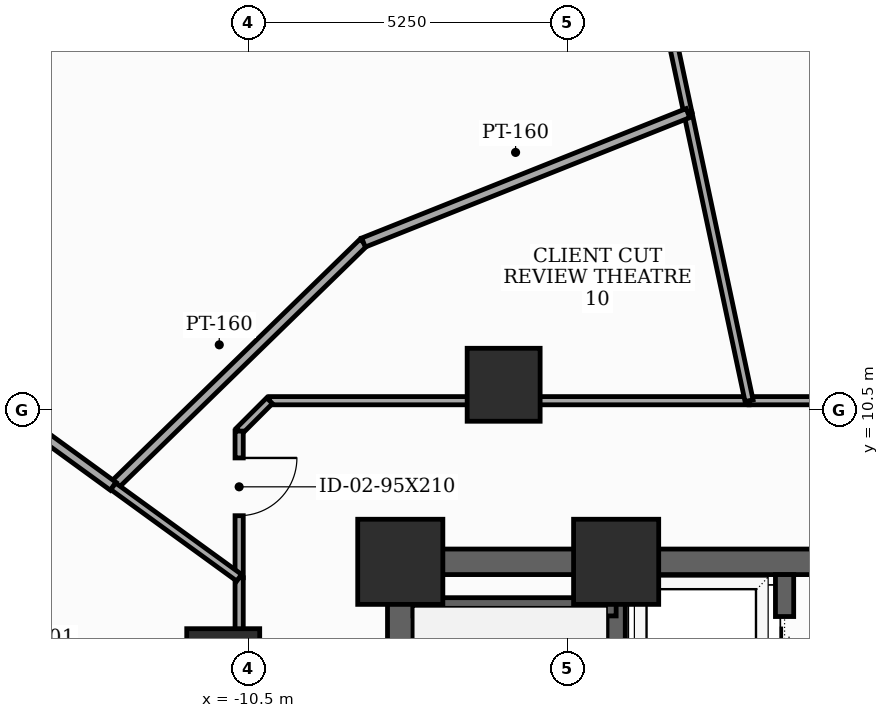
"""IFC4 building model, lengths in metres.
Left out: names, types, materials, properties, quantities, classifications, styles, units other than length and angle.
Written with IfcOpenShell. Run it as: python <this file> out.ifc"""

import sys

from ifc_helpers import new_model, si_unit, direction, frame, frame_2d, origin, origin_2d, place, context, subcontext, project, spatial, rectangle, extrude, element, fill, save


model = new_model("IFC4")
c1 = context("Model", 3, precision=1e-05, world=origin(), true_north=direction((0.0, 1.0)))
c2 = subcontext(c1, "Body", "Model", "MODEL_VIEW")
j1 = project(units=[si_unit("LENGTHUNIT", "METRE"), si_unit("PLANEANGLEUNIT", "RADIAN")], contexts=[c1])
p1 = place(None, origin())
s1 = spatial("IfcSite", under=j1, at=p1, CompositionType="ELEMENT")
p2 = place(p1, origin())
s2 = spatial("IfcBuilding", under=s1, at=p2, CompositionType="ELEMENT")
p3 = place(p2, frame((0.0, 0.0, 97.7)))
s3 = spatial("IfcBuildingStorey", under=s2, at=p3, CompositionType="ELEMENT", Elevation=97.7)
for number, where, z_axis, x_axis in (
    (1, (-4.45, 8.0, 0.0), (0.0, 0.0, 1.0), (1.0, 0.0, 0.0)),
    (2, (-8.0, 8.0, 0.0), (0.0, 0.0, 1.0), (1.0, 0.0, 0.0)),
):
    element("IfcColumn", number, at=place(p3, frame(where, z_axis=z_axis, x_axis=x_axis)), inside=s3, PredefinedType="COLUMN", context=c2, shape_type="SweptSolid", body=[
        extrude(rectangle(XDim=1.4, YDim=1.4, at=origin_2d()), origin(), (0.0, 0.0, 1.0), 3.7),
    ])
for number, where, z_axis, x_axis in (
    (3, (-6.3, 10.912, 0.0), (0.0, 0.0, 1.0), (1.0, 0.0, 0.0)),
    (4, (-10.912, 6.3, 0.0), (0.0, 0.0, 1.0), (1.0, 0.0, 0.0)),
):
    element("IfcColumn", number, at=place(p3, frame(where, z_axis=z_axis, x_axis=x_axis)), inside=s3, PredefinedType="COLUMN", context=c2, shape_type="SweptSolid", body=[
        extrude(rectangle(XDim=1.2, YDim=1.2, at=origin_2d()), origin(), (0.0, 0.0, 1.0), 3.7),
    ])
p4 = place(p3, frame((-8.0, -8.0, 0.0), z_axis=(0.0, 0.0, 1.0), x_axis=(0.0, 1.0, 0.0)))
e5 = element("IfcWall", 5, at=p4, inside=s3, PredefinedType="SHEAR", context=c2, shape_type="SweptSolid", body=[
    extrude(rectangle(XDim=16.0, YDim=0.42, at=frame_2d((8.0, 0.0))), origin(), (0.0, 0.0, 1.0), 3.5),
])
p5 = place(p4, frame((0.922, 0.0, 0.0)))
e6 = element("IfcOpeningElement", 6, at=p5, cuts=e5, PredefinedType="OPENING", context=c2, shape_type="SweptSolid", body=[
    extrude(rectangle(XDim=0.85, YDim=2.02, at=frame_2d((0.425, 1.01))), frame((0.0, 0.22, 0.0), z_axis=(0.0, -1.0, 0.0), x_axis=(1.0, 0.0, 0.0)), (0.0, 0.0, 1.0), 0.44),
])
p6 = place(p4, frame((5.35, 0.0, 0.0)))
e7 = element("IfcOpeningElement", 7, at=p6, cuts=e5, PredefinedType="OPENING", context=c2, shape_type="SweptSolid", body=[
    extrude(rectangle(XDim=1.05, YDim=2.15, at=frame_2d((0.525, 1.075))), frame((0.0, 0.22, 0.0), z_axis=(0.0, -1.0, 0.0), x_axis=(1.0, 0.0, 0.0)), (0.0, 0.0, 1.0), 0.44),
])
p7 = place(p3, frame((-8.0, 8.0, 0.0), z_axis=(0.0, 0.0, 1.0), x_axis=(1.0, 0.0, 0.0)))
e8 = element("IfcWall", 8, at=p7, inside=s3, PredefinedType="SHEAR", context=c2, shape_type="SweptSolid", body=[
    extrude(rectangle(XDim=16.0, YDim=0.42, at=frame_2d((8.0, 0.0))), origin(), (0.0, 0.0, 1.0), 3.5),
])
p8 = place(p7, frame((7.1, 0.0, 0.0)))
e9 = element("IfcOpeningElement", 9, at=p8, cuts=e8, PredefinedType="OPENING", context=c2, shape_type="SweptSolid", body=[
    extrude(rectangle(XDim=1.8, YDim=2.15, at=frame_2d((0.9, 1.075))), frame((0.0, 0.22, 0.0), z_axis=(0.0, -1.0, 0.0), x_axis=(1.0, 0.0, 0.0)), (0.0, 0.0, 1.0), 0.44),
])
p9 = place(p3, frame((-4.45, -7.79, 0.0), z_axis=(0.0, 0.0, 1.0), x_axis=(0.0, 1.0, 0.0)))
e10 = element("IfcWall", 10, at=p9, inside=s3, PredefinedType="SHEAR", context=c2, shape_type="SweptSolid", body=[
    extrude(rectangle(XDim=15.58, YDim=0.3, at=frame_2d((7.79, 0.0))), origin(), (0.0, 0.0, 1.0), 3.5),
])
p10 = place(p3, frame((-7.79, 7.26, 0.0), z_axis=(0.0, 0.0, 1.0), x_axis=(1.0, 0.0, 0.0)))
e11 = element("IfcWall", 11, at=p10, inside=s3, PredefinedType="SHEAR", context=c2, shape_type="SweptSolid", body=[
    extrude(rectangle(XDim=3.34, YDim=0.3, at=frame_2d((1.67, 0.0))), origin(), (0.0, 0.0, 1.0), 3.5),
])
p11 = place(p3, frame((-1.68, -4.85, 0.0), z_axis=(0.0, 0.0, 1.0), x_axis=(0.0, 1.0, 0.0)))
e12 = element("IfcWall", 12, at=p11, inside=s3, PredefinedType="SHEAR", context=c2, shape_type="SweptSolid", body=[
    extrude(rectangle(XDim=12.64, YDim=0.3, at=frame_2d((6.32, 0.0))), origin(), (0.0, 0.0, 1.0), 3.5),
])
p12 = place(p11, frame((3.95, 0.0, 0.0)))
e13 = element("IfcOpeningElement", 13, at=p12, cuts=e12, PredefinedType="OPENING", context=c2, shape_type="SweptSolid", body=[
    extrude(rectangle(XDim=1.1, YDim=2.1, at=frame_2d((0.55, 1.05))), frame((0.0, 0.16, 0.0), z_axis=(0.0, -1.0, 0.0), x_axis=(1.0, 0.0, 0.0)), (0.0, 0.0, 1.0), 0.32),
])
p13 = place(p11, frame((6.25, 0.0, 0.0)))
e14 = element("IfcOpeningElement", 14, at=p13, cuts=e12, PredefinedType="OPENING", context=c2, shape_type="SweptSolid", body=[
    extrude(rectangle(XDim=1.1, YDim=2.1, at=frame_2d((0.55, 1.05))), frame((0.0, 0.16, 0.0), z_axis=(0.0, -1.0, 0.0), x_axis=(1.0, 0.0, 0.0)), (0.0, 0.0, 1.0), 0.32),
])
p14 = place(p11, frame((8.55, 0.0, 0.0)))
e15 = element("IfcOpeningElement", 15, at=p14, cuts=e12, PredefinedType="OPENING", context=c2, shape_type="SweptSolid", body=[
    extrude(rectangle(XDim=1.1, YDim=2.1, at=frame_2d((0.55, 1.05))), frame((0.0, 0.16, 0.0), z_axis=(0.0, -1.0, 0.0), x_axis=(1.0, 0.0, 0.0)), (0.0, 0.0, 1.0), 0.32),
])
p15 = place(p11, frame((10.85, 0.0, 0.0)))
e16 = element("IfcOpeningElement", 16, at=p15, cuts=e12, PredefinedType="OPENING", context=c2, shape_type="SweptSolid", body=[
    extrude(rectangle(XDim=1.1, YDim=2.1, at=frame_2d((0.55, 1.05))), frame((0.0, 0.16, 0.0), z_axis=(0.0, -1.0, 0.0), x_axis=(1.0, 0.0, 0.0)), (0.0, 0.0, 1.0), 0.32),
])
p16 = place(p11, frame((0.45, 0.0, 0.0)))
e17 = element("IfcOpeningElement", 17, at=p16, cuts=e12, PredefinedType="OPENING", context=c2, shape_type="SweptSolid", body=[
    extrude(rectangle(XDim=0.85, YDim=2.02, at=frame_2d((0.425, 1.01))), frame((0.0, 0.16, 0.0), z_axis=(0.0, -1.0, 0.0), x_axis=(1.0, 0.0, 0.0)), (0.0, 0.0, 1.0), 0.32),
])
p17 = place(p11, frame((2.05, 0.0, 0.0)))
e18 = element("IfcOpeningElement", 18, at=p17, cuts=e12, PredefinedType="OPENING", context=c2, shape_type="SweptSolid", body=[
    extrude(rectangle(XDim=0.85, YDim=2.02, at=frame_2d((0.425, 1.01))), frame((0.0, 0.16, 0.0), z_axis=(0.0, -1.0, 0.0), x_axis=(1.0, 0.0, 0.0)), (0.0, 0.0, 1.0), 0.32),
])
p18 = place(p3, frame((10.15, 10.65, 0.0), z_axis=(0.0, 0.0, 1.0), x_axis=(-1.0, 0.0, 0.0)))
e19 = element("IfcWall", 19, at=p18, inside=s3, PredefinedType="PARTITIONING", context=c2, shape_type="SweptSolid", body=[
    extrude(rectangle(XDim=12.414, YDim=0.135, at=frame_2d((6.207, 0.0))), origin(), (0.0, 0.0, 1.0), 2.785),
])
p19 = place(p18, frame((7.222, 0.0, 0.0)))
e20 = element("IfcOpeningElement", 20, at=p19, cuts=e19, PredefinedType="OPENING", context=c2, shape_type="SweptSolid", body=[
    extrude(rectangle(XDim=0.95, YDim=2.1, at=frame_2d((0.475, 1.05))), frame((0.0, 0.077, 0.0), z_axis=(0.0, -1.0, 0.0), x_axis=(1.0, 0.0, 0.0)), (0.0, 0.0, 1.0), 0.155),
])
p20 = place(p3, frame((-2.264, 10.65, 0.0), z_axis=(0.0, 0.0, 1.0), x_axis=(-1.0, 0.0, 0.0)))
e21 = element("IfcWall", 21, at=p20, inside=s3, PredefinedType="PARTITIONING", context=c2, shape_type="SweptSolid", body=[
    extrude(rectangle(XDim=7.886, YDim=0.135, at=frame_2d((3.943, 0.0))), origin(), (0.0, 0.0, 1.0), 2.785),
])
p21 = place(p3, frame((-10.15, 10.65, 0.0), z_axis=(0.0, 0.0, 1.0), x_axis=(-0.707106781187, -0.707106781187, 0.0)))
e22 = element("IfcWall", 22, at=p21, inside=s3, PredefinedType="PARTITIONING", context=c2, shape_type="SweptSolid", body=[
    extrude(rectangle(XDim=0.707, YDim=0.135, at=frame_2d((0.354, 0.0))), origin(), (0.0, 0.0, 1.0), 3.5),
])
p22 = place(p3, frame((-10.65, 10.15, 0.0), z_axis=(0.0, 0.0, 1.0), x_axis=(0.0, -1.0, 0.0)))
e23 = element("IfcWall", 23, at=p22, inside=s3, PredefinedType="PARTITIONING", context=c2, shape_type="SweptSolid", body=[
    extrude(rectangle(XDim=2.412, YDim=0.135, at=frame_2d((1.206, 0.0))), origin(), (0.0, 0.0, 1.0), 3.5),
])
p23 = place(p22, frame((0.442, 0.0, 0.0)))
e24 = element("IfcOpeningElement", 24, at=p23, cuts=e23, PredefinedType="OPENING", context=c2, shape_type="SweptSolid", body=[
    extrude(rectangle(XDim=0.95, YDim=2.1, at=frame_2d((0.475, 1.05))), frame((0.0, 0.077, 0.0), z_axis=(0.0, -1.0, 0.0), x_axis=(1.0, 0.0, 0.0)), (0.0, 0.0, 1.0), 0.155),
])
p24 = place(p3, frame((-10.65, 7.738, 0.0), z_axis=(0.0, 0.0, 1.0), x_axis=(0.0, -1.0, 0.0)))
e25 = element("IfcWall", 25, at=p24, inside=s3, PredefinedType="PARTITIONING", context=c2, shape_type="SweptSolid", body=[
    extrude(rectangle(XDim=5.288, YDim=0.135, at=frame_2d((2.644, 0.0))), origin(), (0.0, 0.0, 1.0), 2.785),
])
p25 = place(p24, frame((3.755, 0.0, 0.0)))
e26 = element("IfcOpeningElement", 26, at=p25, cuts=e25, PredefinedType="OPENING", context=c2, shape_type="SweptSolid", body=[
    extrude(rectangle(XDim=0.95, YDim=2.1, at=frame_2d((0.475, 1.05))), frame((0.0, 0.077, 0.0), z_axis=(0.0, -1.0, 0.0), x_axis=(1.0, 0.0, 0.0)), (0.0, 0.0, 1.0), 0.155),
])
p26 = place(p3, frame((-6.381, 30.021, 0.0), z_axis=(0.0, 0.0, 1.0), x_axis=(0.207886847462, -0.978152881022, 0.0)))
e27 = element("IfcWall", 27, at=p26, inside=s3, PredefinedType="PARTITIONING", context=c2, shape_type="SweptSolid", body=[
    extrude(rectangle(XDim=14.968, YDim=0.135, at=frame_2d((7.484, 0.0))), origin(), (0.0, 0.0, 1.0), 2.935),
])
p27 = place(p26, frame((7.024, 0.0, 0.0)))
e28 = element("IfcOpeningElement", 28, at=p27, cuts=e27, PredefinedType="OPENING", context=c2, shape_type="SweptSolid", body=[
    extrude(rectangle(XDim=0.92, YDim=2.1, at=frame_2d((0.46, 1.05))), frame((0.0, 0.077, 0.0), z_axis=(0.0, -1.0, 0.0), x_axis=(1.0, 0.0, 0.0)), (0.0, 0.0, 1.0), 0.155),
])
p28 = place(p3, frame((-3.269, 15.38, 0.0), z_axis=(0.0, 0.0, 1.0), x_axis=(0.207859963491, -0.978158594287, 0.0)))
e29 = element("IfcWall", 29, at=p28, inside=s3, PredefinedType="PARTITIONING", context=c2, shape_type="SweptSolid", body=[
    extrude(rectangle(XDim=4.836, YDim=0.135, at=frame_2d((2.418, 0.0))), origin(), (0.0, 0.0, 1.0), 2.785),
])
p29 = place(p3, frame((-12.721, 9.242, 0.0), z_axis=(0.0, 0.0, 1.0), x_axis=(0.716351016203, 0.697740081682, 0.0)))
e30 = element("IfcWall", 30, at=p29, inside=s3, PredefinedType="PARTITIONING", context=c2, shape_type="SweptSolid", body=[
    extrude(rectangle(XDim=5.746, YDim=0.16, at=frame_2d((2.873, 0.0))), origin(), (0.0, 0.0, 1.0), 2.785),
])
p30 = place(p3, frame((-8.605, 13.251, 0.0), z_axis=(0.0, 0.0, 1.0), x_axis=(0.928804577443, 0.370569908277, 0.0)))
e31 = element("IfcWall", 31, at=p30, inside=s3, PredefinedType="PARTITIONING", context=c2, shape_type="SweptSolid", body=[
    extrude(rectangle(XDim=5.745, YDim=0.16, at=frame_2d((2.873, 0.0))), origin(), (0.0, 0.0, 1.0), 2.785),
])
p31 = place(p3, frame((-14.1, 10.245, 0.0), z_axis=(0.0, 0.0, 1.0), x_axis=(0.808828948323, -0.588043988452, 0.0)))
e32 = element("IfcWall", 32, at=p31, inside=s3, PredefinedType="PARTITIONING", context=c2, shape_type="SweptSolid", body=[
    extrude(rectangle(XDim=1.705, YDim=0.16, at=frame_2d((0.853, 0.0))), origin(), (0.0, 0.0, 1.0), 3.125),
])
p32 = place(p3, frame((-12.721, 9.242, 0.0), z_axis=(0.0, 0.0, 1.0), x_axis=(0.80916485127, -0.58758169089, 0.0)))
e33 = element("IfcWall", 33, at=p32, inside=s3, PredefinedType="PARTITIONING", context=c2, shape_type="SweptSolid", body=[
    extrude(rectangle(XDim=2.56, YDim=0.135, at=frame_2d((1.28, 0.0))), origin(), (0.0, 0.0, 1.0), 3.125),
])
p33 = place(p15, origin())
e34 = element("IfcDoor", 34, at=p33, inside=s3, OperationType="SLIDING_TO_LEFT", PredefinedType="DOOR", context=c2, shape_type="SweptSolid", body=[
    extrude(rectangle(XDim=1.1, YDim=2.1, at=frame_2d((0.55, 1.05))), frame((0.0, 0.025, 0.0), z_axis=(0.0, -1.0, 0.0), x_axis=(1.0, 0.0, 0.0)), (0.0, 0.0, 1.0), 0.05),
])
fill(e16, e34)
p34 = place(p23, origin())
e35 = element("IfcDoor", 35, at=p34, inside=s3, OperationType="SINGLE_SWING_LEFT", PredefinedType="DOOR", context=c2, shape_type="SweptSolid", body=[
    extrude(rectangle(XDim=0.95, YDim=2.1, at=frame_2d((0.475, 1.05))), frame((0.0, 0.025, 0.0), z_axis=(0.0, -1.0, 0.0), x_axis=(1.0, 0.0, 0.0)), (0.0, 0.0, 1.0), 0.05),
])
fill(e24, e35)
save(model, sys.argv[1])
